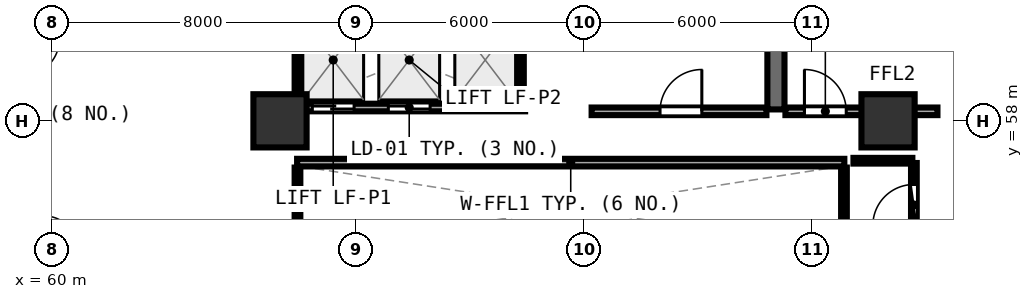
"""IFC4 building model, lengths in metres.
Left out: names, types, materials, properties, quantities, classifications, styles, units other than length and angle.
Written with IfcOpenShell. Run it as: python <this file> out.ifc"""

import sys

from ifc_helpers import new_model, si_unit, direction, frame, frame_2d, origin, origin_2d, place, context, subcontext, project, spatial, rectangle, extrude, element, fill, save


model = new_model("IFC4")
c1 = context("Model", 3, precision=1e-05, world=origin(), true_north=direction((0.0, 1.0)))
c2 = subcontext(c1, "Body", "Model", "MODEL_VIEW")
j1 = project(units=[si_unit("LENGTHUNIT", "METRE"), si_unit("PLANEANGLEUNIT", "RADIAN")], contexts=[c1])
p1 = place(None, origin())
s1 = spatial("IfcSite", under=j1, at=p1, CompositionType="ELEMENT")
p2 = place(p1, origin())
s2 = spatial("IfcBuilding", under=s1, at=p2, CompositionType="ELEMENT")
p3 = place(p2, frame((0.0, 0.0, 22.5)))
s3 = spatial("IfcBuildingStorey", under=s2, at=p3, CompositionType="ELEMENT", Elevation=22.5)
for number, where, z_axis, x_axis in (
    (1, (82.0, 58.0, 0.0), (0.0, 0.0, 1.0), (1.0, 0.0, 0.0)),
    (2, (66.0, 58.0, 0.0), (0.0, 0.0, 1.0), (1.0, 0.0, 0.0)),
):
    element("IfcColumn", number, at=place(p3, frame(where, z_axis=z_axis, x_axis=x_axis)), inside=s3, PredefinedType="PILASTER", context=c2, shape_type="SweptSolid", body=[
        extrude(rectangle(XDim=1.4, YDim=1.4, at=origin_2d()), origin(), (0.0, 0.0, 1.0), 3.75),
    ])
p4 = place(p3, frame((79.05, 58.3, 0.0), z_axis=(0.0, 0.0, 1.0), x_axis=(0.0, 1.0, 0.0)))
e3 = element("IfcWall", 3, at=p4, inside=s3, PredefinedType="SHEAR", context=c2, shape_type="SweptSolid", body=[
    extrude(rectangle(XDim=6.3, YDim=0.45, at=frame_2d((3.15, 0.0))), origin(), (0.0, 0.0, 1.0), 3.49),
])
p5 = place(p3, frame((74.2, 58.25, 0.0), z_axis=(0.0, 0.0, 1.0), x_axis=(1.0, 0.0, 0.0)))
e4 = element("IfcWall", 4, at=p5, inside=s3, PredefinedType="SOLIDWALL", context=c2, shape_type="SweptSolid", body=[
    extrude(rectangle(XDim=4.6, YDim=0.2, at=frame_2d((2.3, 0.0))), origin(), (0.0, 0.0, 1.0), 3.48),
])
p6 = place(p5, frame((1.8, 0.0, 0.0)))
e5 = element("IfcOpeningElement", 5, at=p6, cuts=e4, PredefinedType="OPENING", context=c2, shape_type="SweptSolid", body=[
    extrude(rectangle(XDim=1.1, YDim=2.1, at=frame_2d((0.55, 1.05))), frame((0.0, 0.11, 0.0), z_axis=(0.0, -1.0, 0.0), x_axis=(1.0, 0.0, 0.0)), (0.0, 0.0, 1.0), 0.22),
])
p7 = place(p3, frame((79.3, 58.25, 0.0), z_axis=(0.0, 0.0, 1.0), x_axis=(1.0, 0.0, 0.0)))
e6 = element("IfcWall", 6, at=p7, inside=s3, PredefinedType="SOLIDWALL", context=c2, shape_type="SweptSolid", body=[
    extrude(rectangle(XDim=4.0, YDim=0.2, at=frame_2d((2.0, 0.0))), origin(), (0.0, 0.0, 1.0), 2.775),
])
p8 = place(p7, frame((0.5, 0.0, 0.0)))
e7 = element("IfcOpeningElement", 7, at=p8, cuts=e6, PredefinedType="OPENING", context=c2, shape_type="SweptSolid", body=[
    extrude(rectangle(XDim=1.1, YDim=2.1, at=frame_2d((0.55, 1.05))), frame((0.0, 0.11, 0.0), z_axis=(0.0, -1.0, 0.0), x_axis=(1.0, 0.0, 0.0)), (0.0, 0.0, 1.0), 0.22),
])
p9 = place(p3, frame((66.45, 58.35, 0.0), z_axis=(0.0, 0.0, 1.0), x_axis=(1.0, 0.0, 0.0)))
e8 = element("IfcWall", 8, at=p9, inside=s3, PredefinedType="SOLIDWALL", context=c2, shape_type="SweptSolid", body=[
    extrude(rectangle(XDim=6.0, YDim=0.2, at=frame_2d((3.0, 0.0))), origin(), (0.0, 0.0, 1.0), 3.48),
])
p10 = place(p9, frame((0.4, 0.0, 0.0)))
e9 = element("IfcOpeningElement", 9, at=p10, cuts=e8, PredefinedType="OPENING", context=c2, shape_type="SweptSolid", body=[
    extrude(rectangle(XDim=1.1, YDim=2.1, at=frame_2d((0.55, 1.05))), frame((0.0, 0.11, 0.0), z_axis=(0.0, -1.0, 0.0), x_axis=(1.0, 0.0, 0.0)), (0.0, 0.0, 1.0), 0.22),
])
p11 = place(p9, frame((2.4, 0.0, 0.0)))
e10 = element("IfcOpeningElement", 10, at=p11, cuts=e8, PredefinedType="OPENING", context=c2, shape_type="SweptSolid", body=[
    extrude(rectangle(XDim=1.1, YDim=2.1, at=frame_2d((0.55, 1.05))), frame((0.0, 0.11, 0.0), z_axis=(0.0, -1.0, 0.0), x_axis=(1.0, 0.0, 0.0)), (0.0, 0.0, 1.0), 0.22),
])
p12 = place(p9, frame((4.4, 0.0, 0.0)))
e11 = element("IfcOpeningElement", 11, at=p12, cuts=e8, PredefinedType="OPENING", context=c2, shape_type="SweptSolid", body=[
    extrude(rectangle(XDim=1.1, YDim=2.1, at=frame_2d((0.55, 1.05))), frame((0.0, 0.11, 0.0), z_axis=(0.0, -1.0, 0.0), x_axis=(1.0, 0.0, 0.0)), (0.0, 0.0, 1.0), 0.22),
])
for number, where, z_axis, x_axis in (
    (12, (66.46, 58.48, 0.0), (0.0, 0.0, 1.0), (0.0, 1.0, 0.0)),
    (13, (72.34, 58.48, 0.0), (0.0, 0.0, 1.0), (0.0, 1.0, 0.0)),
):
    element("IfcWall", number, at=place(p3, frame(where, z_axis=z_axis, x_axis=x_axis)), inside=s3, PredefinedType="PARTITIONING", context=c2, shape_type="SweptSolid", body=[
        extrude(rectangle(XDim=2.46, YDim=0.15, at=frame_2d((1.23, 0.0))), origin(), (0.0, 0.0, 1.0), 3.48),
    ])
p13 = place(p3, frame((66.45, 56.9, 0.0), z_axis=(0.0, 0.0, 1.0), x_axis=(1.0, 0.0, 0.0)))
e14 = element("IfcWall", 14, at=p13, inside=s3, PredefinedType="SOLIDWALL", context=c2, shape_type="SweptSolid", body=[
    extrude(rectangle(XDim=14.4, YDim=0.2, at=frame_2d((7.2, 0.0))), origin(), (0.0, 0.0, 1.0), 3.48),
])
for number, where, z_axis, x_axis in (
    (15, (66.46, 54.48, 0.0), (0.0, 0.0, 1.0), (0.0, 1.0, 0.0)),
    (16, (80.84, 54.48, 0.0), (0.0, 0.0, 1.0), (0.0, 1.0, 0.0)),
):
    element("IfcWall", number, at=place(p3, frame(where, z_axis=z_axis, x_axis=x_axis)), inside=s3, PredefinedType="PARTITIONING", context=c2, shape_type="SweptSolid", body=[
        extrude(rectangle(XDim=2.29, YDim=0.15, at=frame_2d((1.145, 0.0))), origin(), (0.0, 0.0, 1.0), 3.48),
    ])
p14 = place(p3, frame((82.68, 54.68, 0.0), z_axis=(0.0, 0.0, 1.0), x_axis=(0.0, 1.0, 0.0)))
e17 = element("IfcWall", 17, at=p14, inside=s3, PredefinedType="PARTITIONING", context=c2, shape_type="SweptSolid", body=[
    extrude(rectangle(XDim=2.21, YDim=0.15, at=frame_2d((1.105, 0.0))), origin(), (0.0, 0.0, 1.0), 3.48),
])
p15 = place(p14, frame((0.565, 0.0, 0.0)))
e18 = element("IfcOpeningElement", 18, at=p15, cuts=e17, PredefinedType="OPENING", context=c2, shape_type="SweptSolid", body=[
    extrude(rectangle(XDim=1.08, YDim=2.1, at=frame_2d((0.54, 1.05))), frame((0.0, 0.085, 0.0), z_axis=(0.0, -1.0, 0.0), x_axis=(1.0, 0.0, 0.0)), (0.0, 0.0, 1.0), 0.17),
])
p16 = place(p3, frame((58.986, 57.775, 0.0), z_axis=(0.0, 0.0, 1.0), x_axis=(0.244192294026, -0.969726829338, 0.0)))
e19 = element("IfcWall", 19, at=p16, inside=s3, PredefinedType="PARTITIONING", context=c2, shape_type="SweptSolid", body=[
    extrude(rectangle(XDim=5.651, YDim=0.12, at=frame_2d((2.825, 0.0))), origin(), (0.0, 0.0, 1.0), 3.48),
])
p17 = place(p16, frame((2.375, 0.0, 0.0)))
e20 = element("IfcOpeningElement", 20, at=p17, cuts=e19, PredefinedType="OPENING", context=c2, shape_type="SweptSolid", body=[
    extrude(rectangle(XDim=0.9, YDim=2.08, at=frame_2d((0.45, 1.04))), frame((0.0, 0.07, 0.0), z_axis=(0.0, -1.0, 0.0), x_axis=(1.0, 0.0, 0.0)), (0.0, 0.0, 1.0), 0.14),
])
p18 = place(p3, frame((82.64, 56.95, 0.0), z_axis=(0.0, 0.0, 1.0), x_axis=(-1.0, 0.0, 0.0)))
e21 = element("IfcWall", 21, at=p18, inside=s3, PredefinedType="PARTITIONING", context=c2, shape_type="SweptSolid", body=[
    extrude(rectangle(XDim=1.55, YDim=0.15, at=frame_2d((0.775, 0.0))), origin(), (0.0, 0.0, 1.0), 2.775),
])
p19 = place(p6, frame((1.1, 0.0, 0.0), z_axis=(0.0, 0.0, 1.0), x_axis=(-1.0, 0.0, 0.0)))
e22 = element("IfcDoor", 22, at=p19, inside=s3, OperationType="SINGLE_SWING_LEFT", PredefinedType="DOOR", context=c2, shape_type="SweptSolid", body=[
    extrude(rectangle(XDim=1.1, YDim=2.1, at=frame_2d((0.55, 1.05))), frame((0.0, 0.025, 0.0), z_axis=(0.0, -1.0, 0.0), x_axis=(1.0, 0.0, 0.0)), (0.0, 0.0, 1.0), 0.05),
])
fill(e5, e22)
p20 = place(p8, frame((1.1, 0.0, 0.0), z_axis=(0.0, 0.0, 1.0), x_axis=(-1.0, 0.0, 0.0)))
e23 = element("IfcDoor", 23, at=p20, inside=s3, OperationType="SINGLE_SWING_RIGHT", PredefinedType="DOOR", context=c2, shape_type="SweptSolid", body=[
    extrude(rectangle(XDim=1.1, YDim=2.1, at=frame_2d((0.55, 1.05))), frame((0.0, 0.025, 0.0), z_axis=(0.0, -1.0, 0.0), x_axis=(1.0, 0.0, 0.0)), (0.0, 0.0, 1.0), 0.05),
])
fill(e7, e23)
p21 = place(p10, origin())
e24 = element("IfcDoor", 24, at=p21, inside=s3, OperationType="DOUBLE_DOOR_SLIDING", PredefinedType="DOOR", context=c2, shape_type="SweptSolid", body=[
    extrude(rectangle(XDim=1.1, YDim=2.1, at=frame_2d((0.55, 1.05))), frame((0.0, 0.025, 0.0), z_axis=(0.0, -1.0, 0.0), x_axis=(1.0, 0.0, 0.0)), (0.0, 0.0, 1.0), 0.05),
])
fill(e9, e24)
p22 = place(p11, origin())
e25 = element("IfcDoor", 25, at=p22, inside=s3, OperationType="DOUBLE_DOOR_SLIDING", PredefinedType="DOOR", context=c2, shape_type="SweptSolid", body=[
    extrude(rectangle(XDim=1.1, YDim=2.1, at=frame_2d((0.55, 1.05))), frame((0.0, 0.025, 0.0), z_axis=(0.0, -1.0, 0.0), x_axis=(1.0, 0.0, 0.0)), (0.0, 0.0, 1.0), 0.05),
])
fill(e10, e25)
p23 = place(p12, origin())
e26 = element("IfcDoor", 26, at=p23, inside=s3, OperationType="DOUBLE_DOOR_SLIDING", PredefinedType="DOOR", context=c2, shape_type="SweptSolid", body=[
    extrude(rectangle(XDim=1.1, YDim=2.1, at=frame_2d((0.55, 1.05))), frame((0.0, 0.025, 0.0), z_axis=(0.0, -1.0, 0.0), x_axis=(1.0, 0.0, 0.0)), (0.0, 0.0, 1.0), 0.05),
])
fill(e11, e26)
p24 = place(p15, origin())
e27 = element("IfcDoor", 27, at=p24, inside=s3, OperationType="SINGLE_SWING_LEFT", PredefinedType="DOOR", context=c2, shape_type="SweptSolid", body=[
    extrude(rectangle(XDim=1.08, YDim=2.1, at=frame_2d((0.54, 1.05))), frame((0.0, 0.025, 0.0), z_axis=(0.0, -1.0, 0.0), x_axis=(1.0, 0.0, 0.0)), (0.0, 0.0, 1.0), 0.05),
])
fill(e18, e27)
save(model, sys.argv[1])
